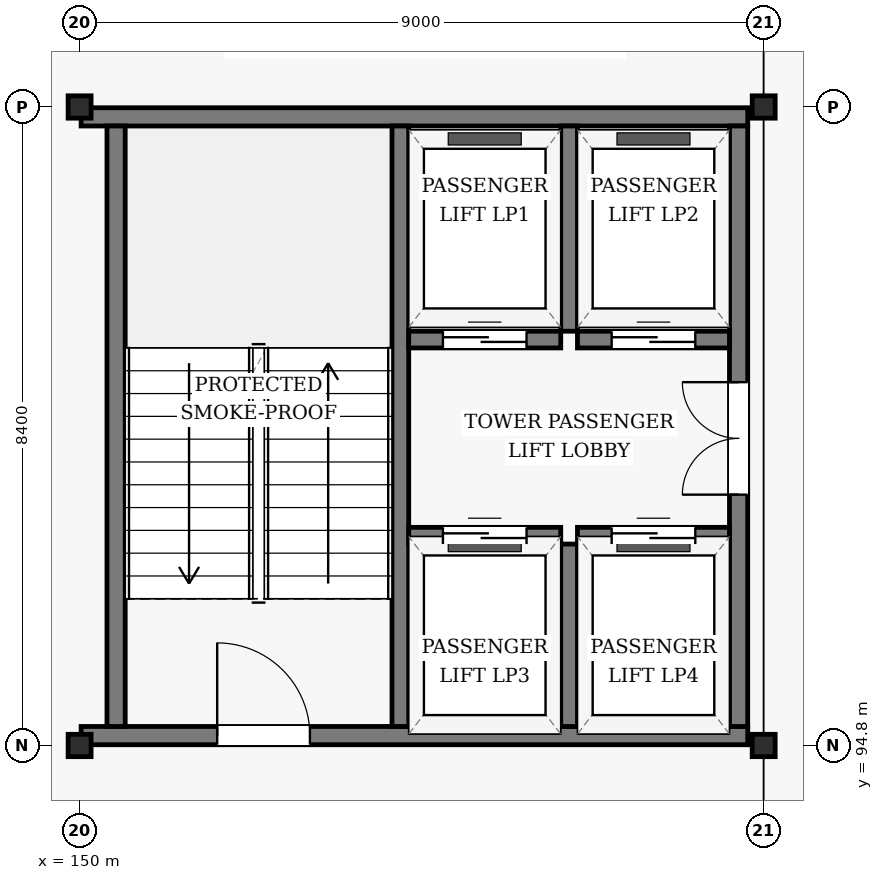
"""IFC4 building model, lengths in metres.
Left out: names, types, materials, properties, quantities, classifications, styles, units other than length and angle.
Written with IfcOpenShell. Run it as: python <this file> out.ifc"""

import sys

from ifc_helpers import new_model, si_unit, direction, frame, frame_2d, origin, origin_2d, place, context, subcontext, project, spatial, rectangle, i_section, extrude, element, fill, save


model = new_model("IFC4")
c1 = context("Model", 3, precision=1e-05, world=origin(), true_north=direction((0.0, 1.0)))
c2 = subcontext(c1, "Body", "Model", "MODEL_VIEW")
j1 = project(units=[si_unit("LENGTHUNIT", "METRE"), si_unit("PLANEANGLEUNIT", "RADIAN")], contexts=[c1])
p1 = place(None, origin())
s1 = spatial("IfcSite", under=j1, at=p1, CompositionType="ELEMENT")
p2 = place(p1, origin())
s2 = spatial("IfcBuilding", under=s1, at=p2, CompositionType="ELEMENT")
p3 = place(p2, frame((0.0, 0.0, 50.4)))
s3 = spatial("IfcBuildingStorey", under=s2, at=p3, CompositionType="ELEMENT", Elevation=50.4)
for number, where, z_axis, x_axis in (
    (1, (150.0, 94.8, 0.0), (0.0, 0.0, 1.0), (1.0, 0.0, 0.0)),
    (2, (150.0, 103.2, 0.0), (0.0, 0.0, 1.0), (1.0, 0.0, 0.0)),
    (3, (159.0, 94.8, 0.0), (0.0, 0.0, 1.0), (1.0, 0.0, 0.0)),
    (4, (159.0, 103.2, 0.0), (0.0, 0.0, 1.0), (1.0, 0.0, 0.0)),
):
    element("IfcColumn", number, at=place(p3, frame(where, z_axis=z_axis, x_axis=x_axis)), inside=s3, PredefinedType="COLUMN", context=c2, shape_type="SweptSolid", body=[
        extrude(i_section(OverallWidth=0.302, OverallDepth=0.294, WebThickness=0.012, FlangeThickness=0.012, FilletRadius=0.018, at=origin_2d()), origin(), (0.0, 0.0, 1.0), 3.6),
    ])
p4 = place(p3, frame((150.02, 94.93, 0.0), z_axis=(0.0, 0.0, 1.0), x_axis=(1.0, 0.0, 0.0)))
e5 = element("IfcWall", 5, at=p4, inside=s3, PredefinedType="SHEAR", context=c2, shape_type="SweptSolid", body=[
    extrude(rectangle(XDim=8.77, YDim=0.24, at=frame_2d((4.385, 0.0))), origin(), (0.0, 0.0, 1.0), 3.346),
])
p5 = place(p4, frame((1.79, 0.0, 0.0)))
e6 = element("IfcOpeningElement", 6, at=p5, cuts=e5, PredefinedType="OPENING", context=c2, shape_type="SweptSolid", body=[
    extrude(rectangle(XDim=1.22, YDim=2.18, at=frame_2d((0.61, 1.09))), frame((0.0, 0.13, 0.0), z_axis=(0.0, -1.0, 0.0), x_axis=(1.0, 0.0, 0.0)), (0.0, 0.0, 1.0), 0.26),
])
p6 = place(p3, frame((150.02, 103.07, 0.0), z_axis=(0.0, 0.0, 1.0), x_axis=(1.0, 0.0, 0.0)))
e7 = element("IfcWall", 7, at=p6, inside=s3, PredefinedType="SHEAR", context=c2, shape_type="SweptSolid", body=[
    extrude(rectangle(XDim=8.77, YDim=0.24, at=frame_2d((4.385, 0.0))), origin(), (0.0, 0.0, 1.0), 3.346),
])
p7 = place(p3, frame((150.48, 95.05, 0.0), z_axis=(0.0, 0.0, 1.0), x_axis=(0.0, 1.0, 0.0)))
e8 = element("IfcWall", 8, at=p7, inside=s3, PredefinedType="SHEAR", context=c2, shape_type="SweptSolid", body=[
    extrude(rectangle(XDim=7.9, YDim=0.24, at=frame_2d((3.95, 0.0))), origin(), (0.0, 0.0, 1.0), 3.346),
])
p8 = place(p3, frame((154.22, 95.05, 0.0), z_axis=(0.0, 0.0, 1.0), x_axis=(0.0, 1.0, 0.0)))
e9 = element("IfcWall", 9, at=p8, inside=s3, PredefinedType="SHEAR", context=c2, shape_type="SweptSolid", body=[
    extrude(rectangle(XDim=7.9, YDim=0.22, at=frame_2d((3.95, 0.0))), origin(), (0.0, 0.0, 1.0), 3.346),
])
p9 = place(p3, frame((158.67, 95.05, 0.0), z_axis=(0.0, 0.0, 1.0), x_axis=(0.0, 1.0, 0.0)))
e10 = element("IfcWall", 10, at=p9, inside=s3, PredefinedType="SHEAR", context=c2, shape_type="SweptSolid", body=[
    extrude(rectangle(XDim=7.9, YDim=0.24, at=frame_2d((3.95, 0.0))), origin(), (0.0, 0.0, 1.0), 3.346),
])
p10 = place(p9, frame((3.05, 0.0, 0.0)))
e11 = element("IfcOpeningElement", 11, at=p10, cuts=e10, PredefinedType="OPENING", context=c2, shape_type="SweptSolid", body=[
    extrude(rectangle(XDim=1.48, YDim=2.22, at=frame_2d((0.74, 1.11))), frame((0.0, 0.13, 0.0), z_axis=(0.0, -1.0, 0.0), x_axis=(1.0, 0.0, 0.0)), (0.0, 0.0, 1.0), 0.26),
])
p11 = place(p3, frame((156.44, 100.25, 0.0), z_axis=(0.0, 0.0, 1.0), x_axis=(0.0, 1.0, 0.0)))
e12 = element("IfcWall", 12, at=p11, inside=s3, PredefinedType="SHEAR", context=c2, shape_type="SweptSolid", body=[
    extrude(rectangle(XDim=2.7, YDim=0.22, at=frame_2d((1.35, 0.0))), origin(), (0.0, 0.0, 1.0), 3.346),
])
p12 = place(p3, frame((154.33, 100.14, 0.0), z_axis=(0.0, 0.0, 1.0), x_axis=(1.0, 0.0, 0.0)))
e13 = element("IfcWall", 13, at=p12, inside=s3, PredefinedType="SHEAR", context=c2, shape_type="SweptSolid", body=[
    extrude(rectangle(XDim=2.0, YDim=0.22, at=frame_2d((1.0, 0.0))), origin(), (0.0, 0.0, 1.0), 3.346),
])
p13 = place(p12, frame((0.45, 0.0, 0.0)))
e14 = element("IfcOpeningElement", 14, at=p13, cuts=e13, PredefinedType="OPENING", context=c2, shape_type="SweptSolid", body=[
    extrude(rectangle(XDim=1.1, YDim=2.15, at=frame_2d((0.55, 1.075))), frame((0.0, 0.12, 0.0), z_axis=(0.0, -1.0, 0.0), x_axis=(1.0, 0.0, 0.0)), (0.0, 0.0, 1.0), 0.24),
])
p14 = place(p3, frame((156.55, 100.14, 0.0), z_axis=(0.0, 0.0, 1.0), x_axis=(1.0, 0.0, 0.0)))
e15 = element("IfcWall", 15, at=p14, inside=s3, PredefinedType="SHEAR", context=c2, shape_type="SweptSolid", body=[
    extrude(rectangle(XDim=2.0, YDim=0.22, at=frame_2d((1.0, 0.0))), origin(), (0.0, 0.0, 1.0), 3.346),
])
p15 = place(p14, frame((0.45, 0.0, 0.0)))
e16 = element("IfcOpeningElement", 16, at=p15, cuts=e15, PredefinedType="OPENING", context=c2, shape_type="SweptSolid", body=[
    extrude(rectangle(XDim=1.1, YDim=2.15, at=frame_2d((0.55, 1.075))), frame((0.0, 0.12, 0.0), z_axis=(0.0, -1.0, 0.0), x_axis=(1.0, 0.0, 0.0)), (0.0, 0.0, 1.0), 0.24),
])
p16 = place(p3, frame((156.44, 95.05, 0.0), z_axis=(0.0, 0.0, 1.0), x_axis=(0.0, 1.0, 0.0)))
e17 = element("IfcWall", 17, at=p16, inside=s3, PredefinedType="SHEAR", context=c2, shape_type="SweptSolid", body=[
    extrude(rectangle(XDim=2.4, YDim=0.22, at=frame_2d((1.2, 0.0))), origin(), (0.0, 0.0, 1.0), 3.346),
])
p17 = place(p3, frame((154.33, 97.56, 0.0), z_axis=(0.0, 0.0, 1.0), x_axis=(1.0, 0.0, 0.0)))
e18 = element("IfcWall", 18, at=p17, inside=s3, PredefinedType="SHEAR", context=c2, shape_type="SweptSolid", body=[
    extrude(rectangle(XDim=2.0, YDim=0.22, at=frame_2d((1.0, 0.0))), origin(), (0.0, 0.0, 1.0), 3.346),
])
p18 = place(p17, frame((0.45, 0.0, 0.0)))
e19 = element("IfcOpeningElement", 19, at=p18, cuts=e18, PredefinedType="OPENING", context=c2, shape_type="SweptSolid", body=[
    extrude(rectangle(XDim=1.1, YDim=2.15, at=frame_2d((0.55, 1.075))), frame((0.0, 0.12, 0.0), z_axis=(0.0, -1.0, 0.0), x_axis=(1.0, 0.0, 0.0)), (0.0, 0.0, 1.0), 0.24),
])
p19 = place(p3, frame((156.55, 97.56, 0.0), z_axis=(0.0, 0.0, 1.0), x_axis=(1.0, 0.0, 0.0)))
e20 = element("IfcWall", 20, at=p19, inside=s3, PredefinedType="SHEAR", context=c2, shape_type="SweptSolid", body=[
    extrude(rectangle(XDim=2.0, YDim=0.22, at=frame_2d((1.0, 0.0))), origin(), (0.0, 0.0, 1.0), 3.346),
])
p20 = place(p19, frame((0.45, 0.0, 0.0)))
e21 = element("IfcOpeningElement", 21, at=p20, cuts=e20, PredefinedType="OPENING", context=c2, shape_type="SweptSolid", body=[
    extrude(rectangle(XDim=1.1, YDim=2.15, at=frame_2d((0.55, 1.075))), frame((0.0, 0.12, 0.0), z_axis=(0.0, -1.0, 0.0), x_axis=(1.0, 0.0, 0.0)), (0.0, 0.0, 1.0), 0.24),
])
p21 = place(p5, origin())
e22 = element("IfcDoor", 22, at=p21, inside=s3, OperationType="SINGLE_SWING_LEFT", PredefinedType="DOOR", context=c2, shape_type="SweptSolid", body=[
    extrude(rectangle(XDim=1.22, YDim=2.18, at=frame_2d((0.61, 1.09))), frame((0.0, 0.025, 0.0), z_axis=(0.0, -1.0, 0.0), x_axis=(1.0, 0.0, 0.0)), (0.0, 0.0, 1.0), 0.05),
])
fill(e6, e22)
p22 = place(p10, origin())
e23 = element("IfcDoor", 23, at=p22, inside=s3, OperationType="DOUBLE_DOOR_SINGLE_SWING", PredefinedType="DOOR", context=c2, shape_type="SweptSolid", body=[
    extrude(rectangle(XDim=1.48, YDim=2.22, at=frame_2d((0.74, 1.11))), frame((0.0, 0.025, 0.0), z_axis=(0.0, -1.0, 0.0), x_axis=(1.0, 0.0, 0.0)), (0.0, 0.0, 1.0), 0.05),
])
fill(e11, e23)
p23 = place(p13, origin())
e24 = element("IfcDoor", 24, at=p23, inside=s3, OperationType="SLIDING_TO_LEFT", PredefinedType="DOOR", context=c2, shape_type="SweptSolid", body=[
    extrude(rectangle(XDim=1.1, YDim=2.15, at=frame_2d((0.55, 1.075))), frame((0.0, 0.025, 0.0), z_axis=(0.0, -1.0, 0.0), x_axis=(1.0, 0.0, 0.0)), (0.0, 0.0, 1.0), 0.05),
])
fill(e14, e24)
p24 = place(p15, origin())
e25 = element("IfcDoor", 25, at=p24, inside=s3, OperationType="SLIDING_TO_LEFT", PredefinedType="DOOR", context=c2, shape_type="SweptSolid", body=[
    extrude(rectangle(XDim=1.1, YDim=2.15, at=frame_2d((0.55, 1.075))), frame((0.0, 0.025, 0.0), z_axis=(0.0, -1.0, 0.0), x_axis=(1.0, 0.0, 0.0)), (0.0, 0.0, 1.0), 0.05),
])
fill(e16, e25)
p25 = place(p18, origin())
e26 = element("IfcDoor", 26, at=p25, inside=s3, OperationType="SLIDING_TO_LEFT", PredefinedType="DOOR", context=c2, shape_type="SweptSolid", body=[
    extrude(rectangle(XDim=1.1, YDim=2.15, at=frame_2d((0.55, 1.075))), frame((0.0, 0.025, 0.0), z_axis=(0.0, -1.0, 0.0), x_axis=(1.0, 0.0, 0.0)), (0.0, 0.0, 1.0), 0.05),
])
fill(e19, e26)
p26 = place(p20, origin())
e27 = element("IfcDoor", 27, at=p26, inside=s3, OperationType="SLIDING_TO_LEFT", PredefinedType="DOOR", context=c2, shape_type="SweptSolid", body=[
    extrude(rectangle(XDim=1.1, YDim=2.15, at=frame_2d((0.55, 1.075))), frame((0.0, 0.025, 0.0), z_axis=(0.0, -1.0, 0.0), x_axis=(1.0, 0.0, 0.0)), (0.0, 0.0, 1.0), 0.05),
])
fill(e21, e27)
save(model, sys.argv[1])
